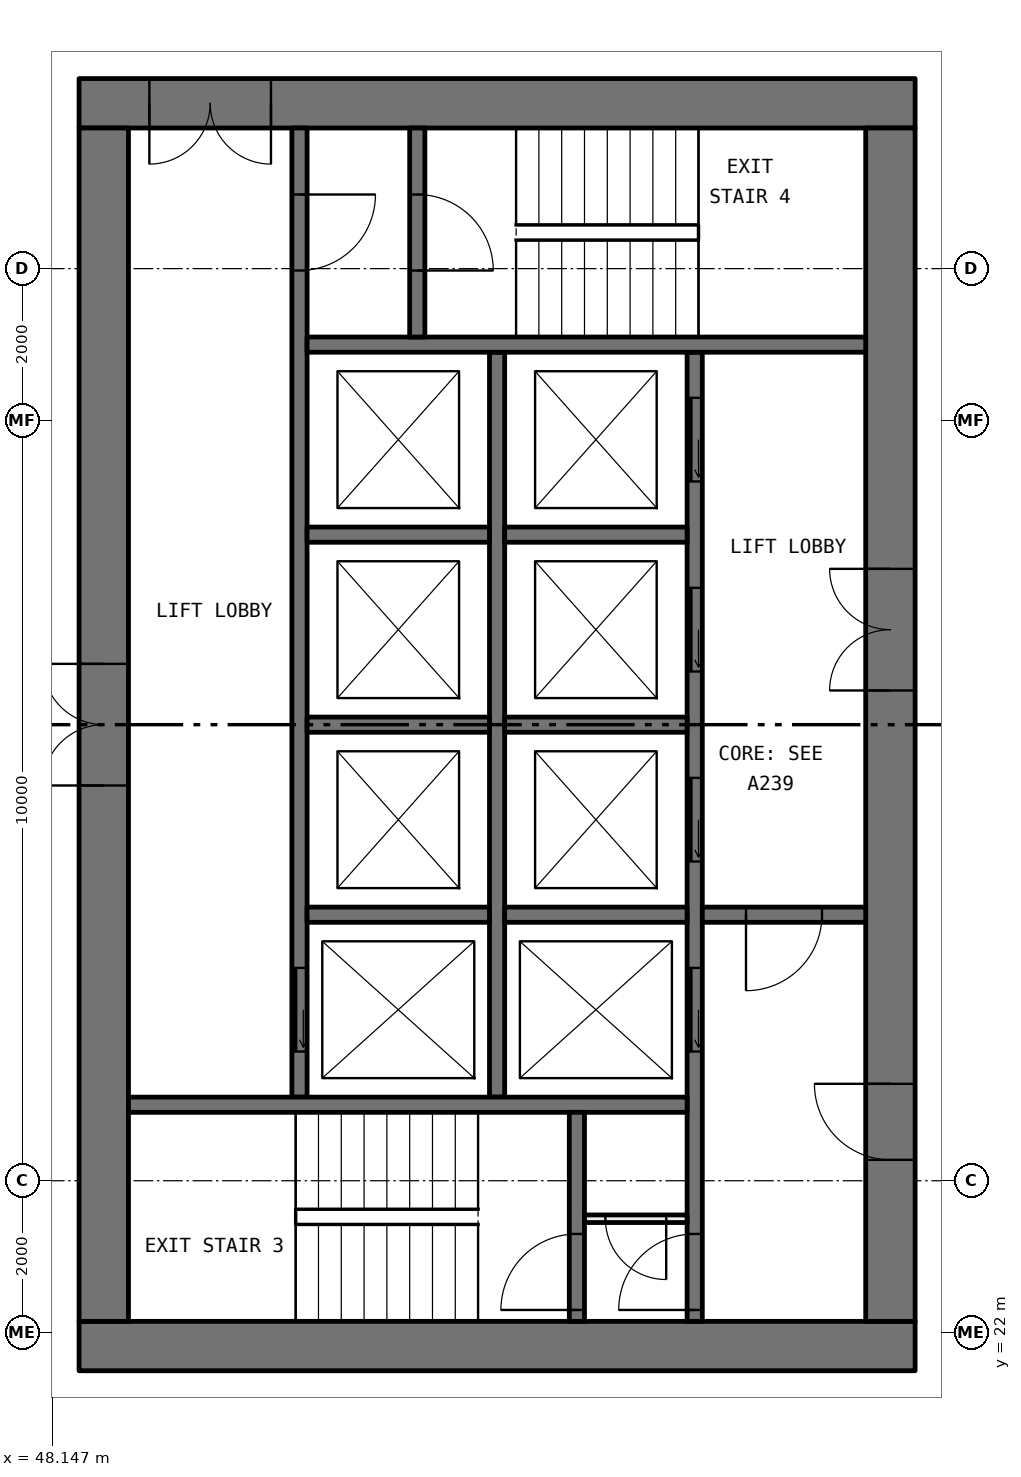
"""IFC4 building model, lengths in metres.
Left out: names, types, materials, properties, quantities, classifications, styles, units other than length and angle.
Written with IfcOpenShell. Run it as: python <this file> out.ifc"""

import sys

from ifc_helpers import new_model, si_unit, direction, frame, frame_2d, origin, place, context, subcontext, project, spatial, rectangle, extrude, element, fill, save


model = new_model("IFC4")
c1 = context("Model", 3, precision=1e-05, world=origin(), true_north=direction((0.0, 1.0)))
c2 = subcontext(c1, "Body", "Model", "MODEL_VIEW")
j1 = project(units=[si_unit("LENGTHUNIT", "METRE"), si_unit("PLANEANGLEUNIT", "RADIAN")], contexts=[c1])
p1 = place(None, origin())
s1 = spatial("IfcSite", under=j1, at=p1, CompositionType="ELEMENT")
p2 = place(p1, origin())
s2 = spatial("IfcBuilding", under=s1, at=p2, CompositionType="ELEMENT")
p3 = place(p2, frame((0.0, 0.0, 144.9)))
s3 = spatial("IfcBuildingStorey", under=s2, at=p3, CompositionType="ELEMENT", Elevation=144.9)
p4 = place(p3, frame((59.5, 21.825, 0.0), z_axis=(0.0, 0.0, 1.0), x_axis=(-1.0, 0.0, 0.0)))
e1 = element("IfcWall", 1, at=p4, inside=s3, PredefinedType="SHEAR", context=c2, shape_type="SweptSolid", body=[
    extrude(rectangle(XDim=11.0, YDim=0.65, at=frame_2d((5.5, 0.0))), origin(), (0.0, 0.0, 1.0), 3.05),
])
p5 = place(p3, frame((59.5, 38.175, 0.0), z_axis=(0.0, 0.0, 1.0), x_axis=(-1.0, 0.0, 0.0)))
e2 = element("IfcWall", 2, at=p5, inside=s3, PredefinedType="SHEAR", context=c2, shape_type="SweptSolid", body=[
    extrude(rectangle(XDim=11.0, YDim=0.65, at=frame_2d((5.5, 0.0))), origin(), (0.0, 0.0, 1.0), 3.05),
])
p6 = place(p5, frame((8.475, 0.0, 0.0)))
e3 = element("IfcOpeningElement", 3, at=p6, cuts=e2, PredefinedType="OPENING", context=c2, shape_type="SweptSolid", body=[
    extrude(rectangle(XDim=1.6, YDim=2.1, at=frame_2d((0.8, 1.05))), frame((0.0, 0.335, 0.0), z_axis=(0.0, -1.0, 0.0), x_axis=(1.0, 0.0, 0.0)), (0.0, 0.0, 1.0), 0.67),
])
p7 = place(p3, frame((59.175, 22.15, 0.0), z_axis=(0.0, 0.0, 1.0), x_axis=(0.0, 1.0, 0.0)))
e4 = element("IfcWall", 4, at=p7, inside=s3, PredefinedType="SHEAR", context=c2, shape_type="SweptSolid", body=[
    extrude(rectangle(XDim=15.7, YDim=0.65, at=frame_2d((7.85, 0.0))), origin(), (0.0, 0.0, 1.0), 3.05),
])
p8 = place(p7, frame((8.3, 0.0, 0.0)))
e5 = element("IfcOpeningElement", 5, at=p8, cuts=e4, PredefinedType="OPENING", context=c2, shape_type="SweptSolid", body=[
    extrude(rectangle(XDim=1.6, YDim=2.1, at=frame_2d((0.8, 1.05))), frame((0.0, 0.335, 0.0), z_axis=(0.0, -1.0, 0.0), x_axis=(1.0, 0.0, 0.0)), (0.0, 0.0, 1.0), 0.67),
])
p9 = place(p7, frame((2.125, 0.0, 0.0)))
e6 = element("IfcOpeningElement", 6, at=p9, cuts=e4, PredefinedType="OPENING", context=c2, shape_type="SweptSolid", body=[
    extrude(rectangle(XDim=1.0, YDim=2.1, at=frame_2d((0.5, 1.05))), frame((0.0, 0.335, 0.0), z_axis=(0.0, -1.0, 0.0), x_axis=(1.0, 0.0, 0.0)), (0.0, 0.0, 1.0), 0.67),
])
p10 = place(p3, frame((48.825, 22.15, 0.0), z_axis=(0.0, 0.0, 1.0), x_axis=(0.0, 1.0, 0.0)))
e7 = element("IfcWall", 7, at=p10, inside=s3, PredefinedType="SHEAR", context=c2, shape_type="SweptSolid", body=[
    extrude(rectangle(XDim=15.7, YDim=0.65, at=frame_2d((7.85, 0.0))), origin(), (0.0, 0.0, 1.0), 3.05),
])
p11 = place(p10, frame((7.05, 0.0, 0.0)))
e8 = element("IfcOpeningElement", 8, at=p11, cuts=e7, PredefinedType="OPENING", context=c2, shape_type="SweptSolid", body=[
    extrude(rectangle(XDim=1.6, YDim=2.1, at=frame_2d((0.8, 1.05))), frame((0.0, 0.335, 0.0), z_axis=(0.0, -1.0, 0.0), x_axis=(1.0, 0.0, 0.0)), (0.0, 0.0, 1.0), 0.67),
])
p12 = place(p3, frame((56.6, 22.15, 0.0), z_axis=(0.0, 0.0, 1.0), x_axis=(0.0, 1.0, 0.0)))
e9 = element("IfcWall", 9, at=p12, inside=s3, PredefinedType="SOLIDWALL", context=c2, shape_type="SweptSolid", body=[
    extrude(rectangle(XDim=12.75, YDim=0.2, at=frame_2d((6.375, 0.0))), origin(), (0.0, 0.0, 1.0), 3.05),
])
p13 = place(p12, frame((3.55, 0.0, 0.0)))
e10 = element("IfcOpeningElement", 10, at=p13, cuts=e9, PredefinedType="OPENING", context=c2, shape_type="SweptSolid", body=[
    extrude(rectangle(XDim=1.1, YDim=2.1, at=frame_2d((0.55, 1.05))), frame((0.0, 0.11, 0.0), z_axis=(0.0, -1.0, 0.0), x_axis=(1.0, 0.0, 0.0)), (0.0, 0.0, 1.0), 0.22),
])
p14 = place(p12, frame((6.05, 0.0, 0.0)))
e11 = element("IfcOpeningElement", 11, at=p14, cuts=e9, PredefinedType="OPENING", context=c2, shape_type="SweptSolid", body=[
    extrude(rectangle(XDim=1.1, YDim=2.1, at=frame_2d((0.55, 1.05))), frame((0.0, 0.11, 0.0), z_axis=(0.0, -1.0, 0.0), x_axis=(1.0, 0.0, 0.0)), (0.0, 0.0, 1.0), 0.22),
])
p15 = place(p12, frame((8.55, 0.0, 0.0)))
e12 = element("IfcOpeningElement", 12, at=p15, cuts=e9, PredefinedType="OPENING", context=c2, shape_type="SweptSolid", body=[
    extrude(rectangle(XDim=1.1, YDim=2.1, at=frame_2d((0.55, 1.05))), frame((0.0, 0.11, 0.0), z_axis=(0.0, -1.0, 0.0), x_axis=(1.0, 0.0, 0.0)), (0.0, 0.0, 1.0), 0.22),
])
p16 = place(p12, frame((11.05, 0.0, 0.0)))
e13 = element("IfcOpeningElement", 13, at=p16, cuts=e9, PredefinedType="OPENING", context=c2, shape_type="SweptSolid", body=[
    extrude(rectangle(XDim=1.1, YDim=2.1, at=frame_2d((0.55, 1.05))), frame((0.0, 0.11, 0.0), z_axis=(0.0, -1.0, 0.0), x_axis=(1.0, 0.0, 0.0)), (0.0, 0.0, 1.0), 0.22),
])
p17 = place(p12, frame((0.15, 0.0, 0.0)))
e14 = element("IfcOpeningElement", 14, at=p17, cuts=e9, PredefinedType="OPENING", context=c2, shape_type="SweptSolid", body=[
    extrude(rectangle(XDim=1.0, YDim=2.1, at=frame_2d((0.5, 1.05))), frame((0.0, 0.11, 0.0), z_axis=(0.0, -1.0, 0.0), x_axis=(1.0, 0.0, 0.0)), (0.0, 0.0, 1.0), 0.22),
])
p18 = place(p3, frame((51.4, 25.1, 0.0), z_axis=(0.0, 0.0, 1.0), x_axis=(0.0, 1.0, 0.0)))
e15 = element("IfcWall", 15, at=p18, inside=s3, PredefinedType="SOLIDWALL", context=c2, shape_type="SweptSolid", body=[
    extrude(rectangle(XDim=12.75, YDim=0.2, at=frame_2d((6.375, 0.0))), origin(), (0.0, 0.0, 1.0), 3.05),
])
p19 = place(p18, frame((0.6, 0.0, 0.0)))
e16 = element("IfcOpeningElement", 16, at=p19, cuts=e15, PredefinedType="OPENING", context=c2, shape_type="SweptSolid", body=[
    extrude(rectangle(XDim=1.1, YDim=2.1, at=frame_2d((0.55, 1.05))), frame((0.0, 0.11, 0.0), z_axis=(0.0, -1.0, 0.0), x_axis=(1.0, 0.0, 0.0)), (0.0, 0.0, 1.0), 0.22),
])
p20 = place(p18, frame((10.875, 0.0, 0.0)))
e17 = element("IfcOpeningElement", 17, at=p20, cuts=e15, PredefinedType="OPENING", context=c2, shape_type="SweptSolid", body=[
    extrude(rectangle(XDim=1.0, YDim=2.1, at=frame_2d((0.5, 1.05))), frame((0.0, 0.11, 0.0), z_axis=(0.0, -1.0, 0.0), x_axis=(1.0, 0.0, 0.0)), (0.0, 0.0, 1.0), 0.22),
])
p21 = place(p3, frame((54.0, 25.1, 0.0), z_axis=(0.0, 0.0, 1.0), x_axis=(0.0, 1.0, 0.0)))
e18 = element("IfcWall", 18, at=p21, inside=s3, PredefinedType="SOLIDWALL", context=c2, shape_type="SweptSolid", body=[
    extrude(rectangle(XDim=9.8, YDim=0.2, at=frame_2d((4.9, 0.0))), origin(), (0.0, 0.0, 1.0), 3.05),
])
for number, where, z_axis, x_axis in (
    (19, (56.5, 25.0, 0.0), (0.0, 0.0, 1.0), (-1.0, 0.0, 0.0)),
    (20, (58.85, 35.0, 0.0), (0.0, 0.0, 1.0), (-1.0, 0.0, 0.0)),
):
    element("IfcWall", number, at=place(p3, frame(where, z_axis=z_axis, x_axis=x_axis)), inside=s3, PredefinedType="SOLIDWALL", context=c2, shape_type="SweptSolid", body=[
        extrude(rectangle(XDim=7.35, YDim=0.2, at=frame_2d((3.675, 0.0))), origin(), (0.0, 0.0, 1.0), 3.05),
    ])
p22 = place(p3, frame((58.85, 27.5, 0.0), z_axis=(0.0, 0.0, 1.0), x_axis=(-1.0, 0.0, 0.0)))
e21 = element("IfcWall", 21, at=p22, inside=s3, PredefinedType="SOLIDWALL", context=c2, shape_type="SweptSolid", body=[
    extrude(rectangle(XDim=2.15, YDim=0.2, at=frame_2d((1.075, 0.0))), origin(), (0.0, 0.0, 1.0), 3.05),
])
p23 = place(p22, frame((0.575, 0.0, 0.0)))
e22 = element("IfcOpeningElement", 22, at=p23, cuts=e21, PredefinedType="OPENING", context=c2, shape_type="SweptSolid", body=[
    extrude(rectangle(XDim=1.0, YDim=2.1, at=frame_2d((0.5, 1.05))), frame((0.0, 0.11, 0.0), z_axis=(0.0, -1.0, 0.0), x_axis=(1.0, 0.0, 0.0)), (0.0, 0.0, 1.0), 0.22),
])
p24 = place(p3, frame((55.05, 22.15, 0.0), z_axis=(0.0, 0.0, 1.0), x_axis=(0.0, 1.0, 0.0)))
e23 = element("IfcWall", 23, at=p24, inside=s3, PredefinedType="SOLIDWALL", context=c2, shape_type="SweptSolid", body=[
    extrude(rectangle(XDim=2.75, YDim=0.2, at=frame_2d((1.375, 0.0))), origin(), (0.0, 0.0, 1.0), 3.05),
])
p25 = place(p24, frame((0.15, 0.0, 0.0)))
e24 = element("IfcOpeningElement", 24, at=p25, cuts=e23, PredefinedType="OPENING", context=c2, shape_type="SweptSolid", body=[
    extrude(rectangle(XDim=1.0, YDim=2.1, at=frame_2d((0.5, 1.05))), frame((0.0, 0.11, 0.0), z_axis=(0.0, -1.0, 0.0), x_axis=(1.0, 0.0, 0.0)), (0.0, 0.0, 1.0), 0.22),
])
p26 = place(p3, frame((52.95, 35.1, 0.0), z_axis=(0.0, 0.0, 1.0), x_axis=(0.0, 1.0, 0.0)))
e25 = element("IfcWall", 25, at=p26, inside=s3, PredefinedType="SOLIDWALL", context=c2, shape_type="SweptSolid", body=[
    extrude(rectangle(XDim=2.75, YDim=0.2, at=frame_2d((1.375, 0.0))), origin(), (0.0, 0.0, 1.0), 3.05),
])
p27 = place(p26, frame((0.875, 0.0, 0.0)))
e26 = element("IfcOpeningElement", 26, at=p27, cuts=e25, PredefinedType="OPENING", context=c2, shape_type="SweptSolid", body=[
    extrude(rectangle(XDim=1.0, YDim=2.1, at=frame_2d((0.5, 1.05))), frame((0.0, 0.11, 0.0), z_axis=(0.0, -1.0, 0.0), x_axis=(1.0, 0.0, 0.0)), (0.0, 0.0, 1.0), 0.22),
])
for number, where, z_axis, x_axis in (
    (27, (56.5, 27.5, 0.0), (0.0, 0.0, 1.0), (-1.0, 0.0, 0.0)),
    (28, (56.5, 30.0, 0.0), (0.0, 0.0, 1.0), (-1.0, 0.0, 0.0)),
    (29, (56.5, 32.5, 0.0), (0.0, 0.0, 1.0), (-1.0, 0.0, 0.0)),
    (30, (53.9, 27.5, 0.0), (0.0, 0.0, 1.0), (-1.0, 0.0, 0.0)),
    (31, (53.9, 30.0, 0.0), (0.0, 0.0, 1.0), (-1.0, 0.0, 0.0)),
    (32, (53.9, 32.5, 0.0), (0.0, 0.0, 1.0), (-1.0, 0.0, 0.0)),
):
    element("IfcWall", number, at=place(p3, frame(where, z_axis=z_axis, x_axis=x_axis)), inside=s3, PredefinedType="SOLIDWALL", context=c2, shape_type="SweptSolid", body=[
        extrude(rectangle(XDim=2.4, YDim=0.2, at=frame_2d((1.2, 0.0))), origin(), (0.0, 0.0, 1.0), 3.05),
    ])
p28 = place(p3, frame((56.5, 23.5, 0.0), z_axis=(0.0, 0.0, 1.0), x_axis=(-1.0, 0.0, 0.0)))
e33 = element("IfcWall", 33, at=p28, inside=s3, PredefinedType="PARTITIONING", context=c2, shape_type="SweptSolid", body=[
    extrude(rectangle(XDim=1.35, YDim=0.1, at=frame_2d((0.675, 0.0))), origin(), (0.0, 0.0, 1.0), 3.05),
])
p29 = place(p28, frame((0.275, 0.0, 0.0)))
e34 = element("IfcOpeningElement", 34, at=p29, cuts=e33, PredefinedType="OPENING", context=c2, shape_type="SweptSolid", body=[
    extrude(rectangle(XDim=0.8, YDim=2.1, at=frame_2d((0.4, 1.05))), frame((0.0, 0.06, 0.0), z_axis=(0.0, -1.0, 0.0), x_axis=(1.0, 0.0, 0.0)), (0.0, 0.0, 1.0), 0.12),
])
p30 = place(p19, origin())
e35 = element("IfcDoor", 35, at=p30, inside=s3, OperationType="SLIDING_TO_LEFT", PredefinedType="DOOR", context=c2, shape_type="SweptSolid", body=[
    extrude(rectangle(XDim=1.1, YDim=2.1, at=frame_2d((0.55, 1.05))), frame((0.0, 0.025, 0.0), z_axis=(0.0, -1.0, 0.0), x_axis=(1.0, 0.0, 0.0)), (0.0, 0.0, 1.0), 0.05),
])
fill(e16, e35)
p31 = place(p13, origin())
e36 = element("IfcDoor", 36, at=p31, inside=s3, OperationType="SLIDING_TO_LEFT", PredefinedType="DOOR", context=c2, shape_type="SweptSolid", body=[
    extrude(rectangle(XDim=1.1, YDim=2.1, at=frame_2d((0.55, 1.05))), frame((0.0, 0.025, 0.0), z_axis=(0.0, -1.0, 0.0), x_axis=(1.0, 0.0, 0.0)), (0.0, 0.0, 1.0), 0.05),
])
fill(e10, e36)
p32 = place(p14, origin())
e37 = element("IfcDoor", 37, at=p32, inside=s3, OperationType="SLIDING_TO_LEFT", PredefinedType="DOOR", context=c2, shape_type="SweptSolid", body=[
    extrude(rectangle(XDim=1.1, YDim=2.1, at=frame_2d((0.55, 1.05))), frame((0.0, 0.025, 0.0), z_axis=(0.0, -1.0, 0.0), x_axis=(1.0, 0.0, 0.0)), (0.0, 0.0, 1.0), 0.05),
])
fill(e11, e37)
p33 = place(p15, origin())
e38 = element("IfcDoor", 38, at=p33, inside=s3, OperationType="SLIDING_TO_LEFT", PredefinedType="DOOR", context=c2, shape_type="SweptSolid", body=[
    extrude(rectangle(XDim=1.1, YDim=2.1, at=frame_2d((0.55, 1.05))), frame((0.0, 0.025, 0.0), z_axis=(0.0, -1.0, 0.0), x_axis=(1.0, 0.0, 0.0)), (0.0, 0.0, 1.0), 0.05),
])
fill(e12, e38)
p34 = place(p16, origin())
e39 = element("IfcDoor", 39, at=p34, inside=s3, OperationType="SLIDING_TO_LEFT", PredefinedType="DOOR", context=c2, shape_type="SweptSolid", body=[
    extrude(rectangle(XDim=1.1, YDim=2.1, at=frame_2d((0.55, 1.05))), frame((0.0, 0.025, 0.0), z_axis=(0.0, -1.0, 0.0), x_axis=(1.0, 0.0, 0.0)), (0.0, 0.0, 1.0), 0.05),
])
fill(e13, e39)
p35 = place(p25, origin())
e40 = element("IfcDoor", 40, at=p35, inside=s3, OperationType="SINGLE_SWING_RIGHT", PredefinedType="DOOR", context=c2, shape_type="SweptSolid", body=[
    extrude(rectangle(XDim=1.0, YDim=2.1, at=frame_2d((0.5, 1.05))), frame((0.0, 0.025, 0.0), z_axis=(0.0, -1.0, 0.0), x_axis=(1.0, 0.0, 0.0)), (0.0, 0.0, 1.0), 0.05),
])
fill(e24, e40)
p36 = place(p17, origin())
e41 = element("IfcDoor", 41, at=p36, inside=s3, OperationType="SINGLE_SWING_RIGHT", PredefinedType="DOOR", context=c2, shape_type="SweptSolid", body=[
    extrude(rectangle(XDim=1.0, YDim=2.1, at=frame_2d((0.5, 1.05))), frame((0.0, 0.025, 0.0), z_axis=(0.0, -1.0, 0.0), x_axis=(1.0, 0.0, 0.0)), (0.0, 0.0, 1.0), 0.05),
])
fill(e14, e41)
p37 = place(p20, frame((1.0, 0.0, 0.0), x_axis=(-1.0, 0.0, 0.0)))
e42 = element("IfcDoor", 42, at=p37, inside=s3, OperationType="SINGLE_SWING_RIGHT", PredefinedType="DOOR", context=c2, shape_type="SweptSolid", body=[
    extrude(rectangle(XDim=1.0, YDim=2.1, at=frame_2d((0.5, 1.05))), frame((0.0, 0.025, 0.0), z_axis=(0.0, -1.0, 0.0), x_axis=(1.0, 0.0, 0.0)), (0.0, 0.0, 1.0), 0.05),
])
fill(e17, e42)
p38 = place(p27, frame((1.0, 0.0, 0.0), x_axis=(-1.0, 0.0, 0.0)))
e43 = element("IfcDoor", 43, at=p38, inside=s3, OperationType="SINGLE_SWING_LEFT", PredefinedType="DOOR", context=c2, shape_type="SweptSolid", body=[
    extrude(rectangle(XDim=1.0, YDim=2.1, at=frame_2d((0.5, 1.05))), frame((0.0, 0.025, 0.0), z_axis=(0.0, -1.0, 0.0), x_axis=(1.0, 0.0, 0.0)), (0.0, 0.0, 1.0), 0.05),
])
fill(e26, e43)
p39 = place(p23, origin())
e44 = element("IfcDoor", 44, at=p39, inside=s3, OperationType="SINGLE_SWING_LEFT", PredefinedType="DOOR", context=c2, shape_type="SweptSolid", body=[
    extrude(rectangle(XDim=1.0, YDim=2.1, at=frame_2d((0.5, 1.05))), frame((0.0, 0.025, 0.0), z_axis=(0.0, -1.0, 0.0), x_axis=(1.0, 0.0, 0.0)), (0.0, 0.0, 1.0), 0.05),
])
fill(e22, e44)
p40 = place(p29, origin())
e45 = element("IfcDoor", 45, at=p40, inside=s3, OperationType="SINGLE_SWING_RIGHT", PredefinedType="DOOR", context=c2, shape_type="SweptSolid", body=[
    extrude(rectangle(XDim=0.8, YDim=2.1, at=frame_2d((0.4, 1.05))), frame((0.0, 0.025, 0.0), z_axis=(0.0, -1.0, 0.0), x_axis=(1.0, 0.0, 0.0)), (0.0, 0.0, 1.0), 0.05),
])
fill(e34, e45)
p41 = place(p8, origin())
e46 = element("IfcDoor", 46, at=p41, inside=s3, OperationType="DOUBLE_DOOR_SINGLE_SWING", PredefinedType="DOOR", context=c2, shape_type="SweptSolid", body=[
    extrude(rectangle(XDim=1.6, YDim=2.1, at=frame_2d((0.8, 1.05))), frame((0.0, 0.025, 0.0), z_axis=(0.0, -1.0, 0.0), x_axis=(1.0, 0.0, 0.0)), (0.0, 0.0, 1.0), 0.05),
])
fill(e5, e46)
p42 = place(p9, origin())
e47 = element("IfcDoor", 47, at=p42, inside=s3, OperationType="SINGLE_SWING_LEFT", PredefinedType="DOOR", context=c2, shape_type="SweptSolid", body=[
    extrude(rectangle(XDim=1.0, YDim=2.1, at=frame_2d((0.5, 1.05))), frame((0.0, 0.025, 0.0), z_axis=(0.0, -1.0, 0.0), x_axis=(1.0, 0.0, 0.0)), (0.0, 0.0, 1.0), 0.05),
])
fill(e6, e47)
p43 = place(p6, origin())
e48 = element("IfcDoor", 48, at=p43, inside=s3, OperationType="DOUBLE_DOOR_SINGLE_SWING", PredefinedType="DOOR", context=c2, shape_type="SweptSolid", body=[
    extrude(rectangle(XDim=1.6, YDim=2.1, at=frame_2d((0.8, 1.05))), frame((0.0, 0.025, 0.0), z_axis=(0.0, -1.0, 0.0), x_axis=(1.0, 0.0, 0.0)), (0.0, 0.0, 1.0), 0.05),
])
fill(e3, e48)
p44 = place(p11, origin())
e49 = element("IfcDoor", 49, at=p44, inside=s3, OperationType="DOUBLE_DOOR_SINGLE_SWING", PredefinedType="DOOR", context=c2, shape_type="SweptSolid", body=[
    extrude(rectangle(XDim=1.6, YDim=2.1, at=frame_2d((0.8, 1.05))), frame((0.0, 0.025, 0.0), z_axis=(0.0, -1.0, 0.0), x_axis=(1.0, 0.0, 0.0)), (0.0, 0.0, 1.0), 0.05),
])
fill(e8, e49)
save(model, sys.argv[1])
